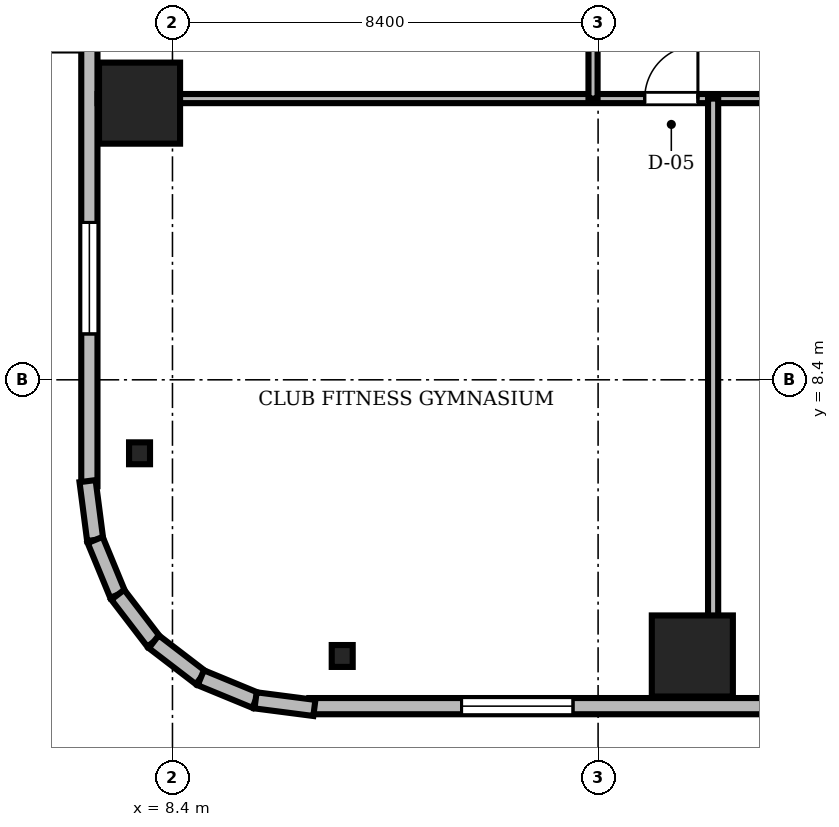
"""IFC4 building model, lengths in metres.
Left out: names, types, materials, properties, quantities, classifications, styles, units other than length and angle.
Written with IfcOpenShell. Run it as: python <this file> out.ifc"""

import sys

from ifc_helpers import new_model, si_unit, direction, frame, frame_2d, origin, origin_2d, place, context, subcontext, project, spatial, rectangle, i_section, extrude, source, transform, mapped, element, fill, save


model = new_model("IFC4")
c1 = context("Model", 3, precision=1e-05, world=origin(), true_north=direction((0.0, 1.0)))
c2 = subcontext(c1, "Body", "Model", "MODEL_VIEW")
j1 = project(units=[si_unit("LENGTHUNIT", "METRE"), si_unit("PLANEANGLEUNIT", "RADIAN")], contexts=[c1])
p1 = place(None, origin())
s1 = spatial("IfcSite", under=j1, at=p1, CompositionType="ELEMENT")
p2 = place(p1, origin())
s2 = spatial("IfcBuilding", under=s1, at=p2, CompositionType="ELEMENT")
p3 = place(p2, frame((0.0, 0.0, 152.0)))
s3 = spatial("IfcBuildingStorey", under=s2, at=p3, CompositionType="ELEMENT", Elevation=152.0)
m1 = source(origin(), c2, "Body", "SweptSolid", [
    extrude(rectangle(XDim=1.6, YDim=1.6, at=origin_2d()), origin(), (0.0, 0.0, 1.0), 3.46),
])
for number, where, z_axis, x_axis in (
    (1, (18.66, 2.95, 0.0), (0.0, 0.0, 1.0), (1.0, 0.0, 0.0)),
    (2, (7.75, 13.86, 0.0), (0.0, 0.0, 1.0), (1.0, 0.0, 0.0)),
):
    element("IfcColumn", number, at=place(p3, frame(where, z_axis=z_axis, x_axis=x_axis)), inside=s3, PredefinedType="COLUMN", context=c2, shape_type="MappedRepresentation", body=[
        mapped(m1, transform((0.0, 0.0, 0.0), scale=1.0)),
    ])
m2 = source(origin(), c2, "Body", "SweptSolid", [
    extrude(i_section(OverallWidth=0.414, OverallDepth=0.432, WebThickness=0.026, FlangeThickness=0.04, FilletRadius=0.015, at=origin_2d()), origin(), (0.0, 0.0, 1.0), 3.46),
])
for number, where, z_axis, x_axis in (
    (3, (11.75, 2.95, 0.0), (0.0, 0.0, 1.0), (1.0, 0.0, 0.0)),
    (4, (7.75, 6.95, 0.0), (0.0, 0.0, 1.0), (1.0, 0.0, 0.0)),
):
    element("IfcColumn", number, at=place(p3, frame(where, z_axis=z_axis, x_axis=x_axis)), inside=s3, PredefinedType="COLUMN", context=c2, shape_type="MappedRepresentation", body=[
        mapped(m2, transform((0.0, 0.0, 0.0), scale=1.0)),
    ])
m3 = source(origin(), c2, "Body", "SweptSolid", [
    extrude(rectangle(XDim=15.6, YDim=0.32, at=frame_2d((7.8, 0.0))), origin(), (0.0, 0.0, 1.0), 3.46),
])
p4 = place(p3, frame((11.1, 1.96, 0.0), z_axis=(0.0, 0.0, 1.0), x_axis=(1.0, 0.0, 0.0)))
e5 = element("IfcWall", 5, at=p4, inside=s3, PredefinedType="SOLIDWALL", context=c2, shape_type="MappedRepresentation", body=[
    mapped(m3, transform((0.0, 0.0, 0.0), scale=1.0)),
])
m4 = source(origin(), c2, "Body", "SweptSolid", [
    extrude(rectangle(XDim=2.2, YDim=2.4, at=frame_2d((1.1, 1.2))), frame((0.0, 0.17, 0.0), z_axis=(0.0, -1.0, 0.0), x_axis=(1.0, 0.0, 0.0)), (0.0, 0.0, 1.0), 0.34),
])
p5 = place(p4, frame((3.005, 0.0, 0.72)))
e6 = element("IfcOpeningElement", 6, at=p5, cuts=e5, PredefinedType="OPENING", context=c2, shape_type="MappedRepresentation", body=[
    mapped(m4, transform((0.0, 0.0, 0.0), scale=1.0)),
])
p6 = place(p3, frame((6.76, 21.9, 0.0), z_axis=(0.0, 0.0, 1.0), x_axis=(0.0, -1.0, 0.0)))
e7 = element("IfcWall", 7, at=p6, inside=s3, PredefinedType="SOLIDWALL", context=c2, shape_type="MappedRepresentation", body=[
    mapped(m3, transform((0.0, 0.0, 0.0), scale=1.0)),
])
m5 = source(origin(), c2, "Body", "SweptSolid", [
    extrude(rectangle(XDim=1.4, YDim=2.3, at=frame_2d((0.7, 1.15))), frame((0.0, 0.17, 0.0), z_axis=(0.0, -1.0, 0.0), x_axis=(1.0, 0.0, 0.0)), (0.0, 0.0, 1.0), 0.34),
])
p7 = place(p6, frame((4.59, 0.0, 0.0)))
e8 = element("IfcOpeningElement", 8, at=p7, cuts=e7, PredefinedType="OPENING", context=c2, shape_type="MappedRepresentation", body=[
    mapped(m5, transform((0.0, 0.0, 0.0), scale=1.0)),
])
p8 = place(p6, frame((10.395, 0.0, 0.72)))
e9 = element("IfcOpeningElement", 9, at=p8, cuts=e7, PredefinedType="OPENING", context=c2, shape_type="MappedRepresentation", body=[
    mapped(m4, transform((0.0, 0.0, 0.0), scale=1.0)),
])
m6 = source(origin(), c2, "Body", "SweptSolid", [
    extrude(rectangle(XDim=1.171, YDim=0.32, at=frame_2d((0.585, 0.0))), origin(), (0.0, 0.0, 1.0), 3.46),
])
p9 = place(p3, frame((6.724, 6.401, 0.0), z_axis=(0.0, 0.0, 1.0), x_axis=(0.128269133229, -0.991739395941, 0.0)))
e10 = element("IfcWall", 10, at=p9, inside=s3, PredefinedType="SOLIDWALL", context=c2, shape_type="MappedRepresentation", body=[
    mapped(m6, transform((0.0, 0.0, 0.0), scale=1.0)),
])
m7 = source(origin(), c2, "Body", "SweptSolid", [
    extrude(rectangle(XDim=1.169, YDim=0.32, at=frame_2d((0.584, 0.0))), origin(), (0.0, 0.0, 1.0), 3.46),
])
for number, where, z_axis, x_axis in (
    (11, (6.875, 5.24, 0.0), (0.0, 0.0, 1.0), (0.381, -0.925, 0.0)),
    (12, (7.32, 4.159, 0.0), (0.0, 0.0, 1.0), (0.608, -0.794, 0.0)),
):
    element("IfcWall", number, at=place(p3, frame(where, z_axis=z_axis, x_axis=x_axis)), inside=s3, PredefinedType="SOLIDWALL", context=c2, shape_type="MappedRepresentation", body=[
        mapped(m7, transform((0.0, 0.0, 0.0), scale=1.0)),
    ])
m8 = source(origin(), c2, "Body", "SweptSolid", [
    extrude(rectangle(XDim=1.169, YDim=0.32, at=frame_2d((0.584, 0.0))), origin(), (0.0, 0.0, 1.0), 3.46),
])
p10 = place(p3, frame((8.031, 3.231, 0.0), z_axis=(0.0, 0.0, 1.0), x_axis=(0.793663520347, -0.608356981114, 0.0)))
e13 = element("IfcWall", 13, at=p10, inside=s3, PredefinedType="SOLIDWALL", context=c2, shape_type="MappedRepresentation", body=[
    mapped(m8, transform((0.0, 0.0, 0.0), scale=1.0)),
])
m9 = source(origin(), c2, "Body", "SweptSolid", [
    extrude(rectangle(XDim=1.169, YDim=0.32, at=frame_2d((0.585, 0.0))), origin(), (0.0, 0.0, 1.0), 3.46),
])
p11 = place(p3, frame((8.959, 2.52, 0.0), z_axis=(0.0, 0.0, 1.0), x_axis=(0.924479075121, -0.381232789334, 0.0)))
e14 = element("IfcWall", 14, at=p11, inside=s3, PredefinedType="SOLIDWALL", context=c2, shape_type="MappedRepresentation", body=[
    mapped(m9, transform((0.0, 0.0, 0.0), scale=1.0)),
])
m10 = source(origin(), c2, "Body", "SweptSolid", [
    extrude(rectangle(XDim=1.17, YDim=0.32, at=frame_2d((0.585, 0.0))), origin(), (0.0, 0.0, 1.0), 3.46),
])
p12 = place(p3, frame((10.04, 2.074, 0.0), z_axis=(0.0, 0.0, 1.0), x_axis=(0.991762485493, -0.128090485085, 0.0)))
e15 = element("IfcWall", 15, at=p12, inside=s3, PredefinedType="SOLIDWALL", context=c2, shape_type="MappedRepresentation", body=[
    mapped(m10, transform((0.0, 0.0, 0.0), scale=1.0)),
])
m11 = source(origin(), c2, "Body", "SweptSolid", [
    extrude(rectangle(XDim=46.156, YDim=0.18, at=frame_2d((23.078, 0.0))), origin(), (0.0, 0.0, 1.0), 2.702),
])
p13 = place(p3, frame((6.922, 13.95, 0.0), z_axis=(0.0, 0.0, 1.0), x_axis=(1.0, 0.0, 0.0)))
e16 = element("IfcWall", 16, at=p13, inside=s3, PredefinedType="PARTITIONING", context=c2, shape_type="MappedRepresentation", body=[
    mapped(m11, transform((0.0, 0.0, 0.0), scale=1.0)),
])
m12 = source(origin(), c2, "Body", "SweptSolid", [
    extrude(rectangle(XDim=1.05, YDim=2.2, at=frame_2d((0.525, 1.1))), frame((0.0, 0.1, 0.0), z_axis=(0.0, -1.0, 0.0), x_axis=(1.0, 0.0, 0.0)), (0.0, 0.0, 1.0), 0.2),
])
p14 = place(p13, frame((10.798, 0.0, 0.0)))
e17 = element("IfcOpeningElement", 17, at=p14, cuts=e16, PredefinedType="OPENING", context=c2, shape_type="MappedRepresentation", body=[
    mapped(m12, transform((0.0, 0.0, 0.0), scale=1.0)),
])
p15 = place(p13, frame((13.353, 0.0, 0.0)))
e18 = element("IfcOpeningElement", 18, at=p15, cuts=e16, PredefinedType="OPENING", context=c2, shape_type="MappedRepresentation", body=[
    mapped(m12, transform((0.0, 0.0, 0.0), scale=1.0)),
])
m13 = source(origin(), c2, "Body", "SweptSolid", [
    extrude(rectangle(XDim=0.95, YDim=2.15, at=frame_2d((0.475, 1.075))), frame((0.0, 0.1, 0.0), z_axis=(0.0, -1.0, 0.0), x_axis=(1.0, 0.0, 0.0)), (0.0, 0.0, 1.0), 0.2),
])
p16 = place(p13, frame((18.531, 0.0, 0.0)))
e19 = element("IfcOpeningElement", 19, at=p16, cuts=e16, PredefinedType="OPENING", context=c2, shape_type="MappedRepresentation", body=[
    mapped(m13, transform((0.0, 0.0, 0.0), scale=1.0)),
])
p17 = place(p13, frame((21.885, 0.0, 0.0)))
e20 = element("IfcOpeningElement", 20, at=p17, cuts=e16, PredefinedType="OPENING", context=c2, shape_type="MappedRepresentation", body=[
    mapped(m12, transform((0.0, 0.0, 0.0), scale=1.0)),
])
p18 = place(p13, frame((26.588, 0.0, 0.0)))
e21 = element("IfcOpeningElement", 21, at=p18, cuts=e16, PredefinedType="OPENING", context=c2, shape_type="MappedRepresentation", body=[
    mapped(m12, transform((0.0, 0.0, 0.0), scale=1.0)),
])
p19 = place(p13, frame((32.516, 0.0, 0.0)))
e22 = element("IfcOpeningElement", 22, at=p19, cuts=e16, PredefinedType="OPENING", context=c2, shape_type="MappedRepresentation", body=[
    mapped(m13, transform((0.0, 0.0, 0.0), scale=1.0)),
])
p20 = place(p13, frame((36.744, 0.0, 0.0)))
e23 = element("IfcOpeningElement", 23, at=p20, cuts=e16, PredefinedType="OPENING", context=c2, shape_type="MappedRepresentation", body=[
    mapped(m12, transform((0.0, 0.0, 0.0), scale=1.0)),
])
p21 = place(p13, frame((41.828, 0.0, 0.0)))
e24 = element("IfcOpeningElement", 24, at=p21, cuts=e16, PredefinedType="OPENING", context=c2, shape_type="MappedRepresentation", body=[
    mapped(m12, transform((0.0, 0.0, 0.0), scale=1.0)),
])
m14 = source(origin(), c2, "Body", "SweptSolid", [
    extrude(rectangle(XDim=14.6, YDim=0.18, at=frame_2d((7.3, 0.0))), origin(), (0.0, 0.0, 1.0), 2.852),
])
p22 = place(p3, frame((16.7, 13.95, 0.0), z_axis=(0.0, 0.0, 1.0), x_axis=(0.0, 1.0, 0.0)))
e25 = element("IfcWall", 25, at=p22, inside=s3, PredefinedType="PARTITIONING", context=c2, shape_type="MappedRepresentation", body=[
    mapped(m14, transform((0.0, 0.0, 0.0), scale=1.0)),
])
p23 = place(p22, frame((1.888, 0.0, 0.0)))
e26 = element("IfcOpeningElement", 26, at=p23, cuts=e25, PredefinedType="OPENING", context=c2, shape_type="MappedRepresentation", body=[
    mapped(m12, transform((0.0, 0.0, 0.0), scale=1.0)),
])
p24 = place(p22, frame((7.93, 0.0, 0.0)))
e27 = element("IfcOpeningElement", 27, at=p24, cuts=e25, PredefinedType="OPENING", context=c2, shape_type="MappedRepresentation", body=[
    mapped(m13, transform((0.0, 0.0, 0.0), scale=1.0)),
])
p25 = place(p22, frame((12.747, 0.0, 0.0)))
e28 = element("IfcOpeningElement", 28, at=p25, cuts=e25, PredefinedType="OPENING", context=c2, shape_type="MappedRepresentation", body=[
    mapped(m13, transform((0.0, 0.0, 0.0), scale=1.0)),
])
m15 = source(origin(), c2, "Body", "SweptSolid", [
    extrude(rectangle(XDim=11.828, YDim=0.2, at=frame_2d((5.914, 0.0))), origin(), (0.0, 0.0, 1.0), 2.702),
])
p26 = place(p3, frame((19.07, 2.122, 0.0), z_axis=(0.0, 0.0, 1.0), x_axis=(0.0, 1.0, 0.0)))
e29 = element("IfcWall", 29, at=p26, inside=s3, PredefinedType="PARTITIONING", context=c2, shape_type="MappedRepresentation", body=[
    mapped(m15, transform((0.0, 0.0, 0.0), scale=1.0)),
])
m16 = source(origin(), c2, "Body", "SweptSolid", [
    extrude(rectangle(XDim=2.2, YDim=2.4, at=frame_2d((1.1, 1.2))), frame((0.0, 0.03, 0.0), z_axis=(0.0, -1.0, 0.0), x_axis=(1.0, 0.0, 0.0)), (0.0, 0.0, 1.0), 0.06),
])
p27 = place(p5, origin())
e30 = element("IfcWindow", 30, at=p27, inside=s3, PartitioningType="SINGLE_PANEL", PredefinedType="WINDOW", context=c2, shape_type="MappedRepresentation", body=[
    mapped(m16, transform((0.0, 0.0, 0.0), scale=1.0)),
])
fill(e6, e30)
p28 = place(p8, origin())
e31 = element("IfcWindow", 31, at=p28, inside=s3, PartitioningType="SINGLE_PANEL", PredefinedType="WINDOW", context=c2, shape_type="MappedRepresentation", body=[
    mapped(m16, transform((0.0, 0.0, 0.0), scale=1.0)),
])
fill(e9, e31)
m17 = source(origin(), c2, "Body", "SweptSolid", [
    extrude(rectangle(XDim=1.05, YDim=2.2, at=frame_2d((0.525, 1.1))), frame((0.0, 0.025, 0.0), z_axis=(0.0, -1.0, 0.0), x_axis=(1.0, 0.0, 0.0)), (0.0, 0.0, 1.0), 0.05),
])
p29 = place(p14, origin())
e32 = element("IfcDoor", 32, at=p29, inside=s3, OperationType="SINGLE_SWING_RIGHT", PredefinedType="DOOR", context=c2, shape_type="MappedRepresentation", body=[
    mapped(m17, transform((0.0, 0.0, 0.0), scale=1.0)),
])
fill(e17, e32)
save(model, sys.argv[1])
